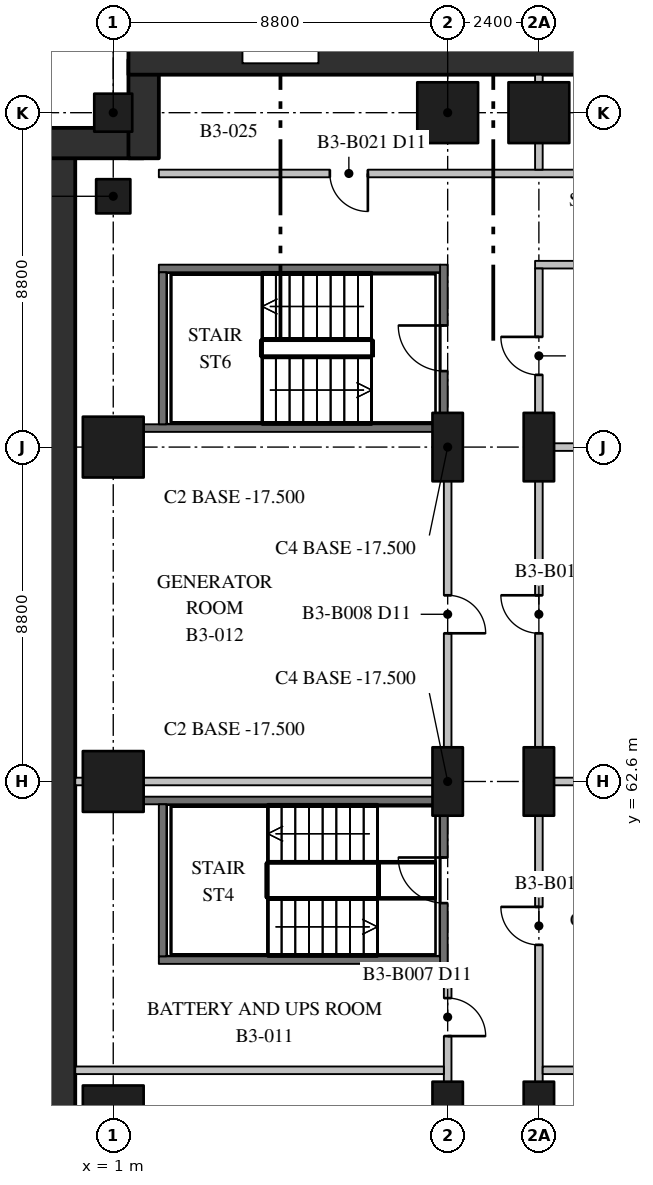
"""IFC4 building model, lengths in metres.
Left out: names, types, materials, properties, quantities, classifications, styles, units other than length and angle.
Written with IfcOpenShell. Run it as: python <this file> out.ifc"""

import sys

from ifc_helpers import new_model, si_unit, direction, frame, frame_2d, origin, origin_2d, place, context, subcontext, project, spatial, rectangle, extrude, element, fill, save


model = new_model("IFC4")
c1 = context("Model", 3, precision=1e-05, world=origin(), true_north=direction((0.0, 1.0)))
c2 = subcontext(c1, "Body", "Model", "MODEL_VIEW")
j1 = project(units=[si_unit("LENGTHUNIT", "METRE"), si_unit("PLANEANGLEUNIT", "RADIAN")], contexts=[c1])
p1 = place(None, origin())
s1 = spatial("IfcSite", under=j1, at=p1, CompositionType="ELEMENT")
p2 = place(p1, origin())
s2 = spatial("IfcBuilding", under=s1, at=p2, CompositionType="ELEMENT")
p3 = place(p2, frame((0.0, 0.0, -17.0)))
s3 = spatial("IfcBuildingStorey", under=s2, at=p3, CompositionType="ELEMENT", Elevation=-17.0)
for number, where, z_axis, x_axis in (
    (1, (1.0, 53.8, -0.5), (0.0, 0.0, 1.0), (1.0, 0.0, 0.0)),
    (2, (1.0, 62.6, -0.5), (0.0, 0.0, 1.0), (1.0, 0.0, 0.0)),
    (3, (1.0, 71.4, -0.5), (0.0, 0.0, 1.0), (1.0, 0.0, 0.0)),
):
    element("IfcColumn", number, at=place(p3, frame(where, z_axis=z_axis, x_axis=x_axis)), inside=s3, PredefinedType="COLUMN", context=c2, shape_type="SweptSolid", body=[
        extrude(rectangle(XDim=1.6, YDim=1.6, at=origin_2d()), origin(), (0.0, 0.0, 1.0), 5.5),
    ])
p4 = place(p3, frame((1.0, 80.2, -0.5), z_axis=(0.0, 0.0, 1.0), x_axis=(1.0, 0.0, 0.0)))
e4 = element("IfcColumn", 4, at=p4, inside=s3, PredefinedType="COLUMN", context=c2, shape_type="SweptSolid", body=[
    extrude(rectangle(XDim=1.0, YDim=1.0, at=origin_2d()), origin(), (0.0, 0.0, 1.0), 5.5),
])
for number, where, z_axis, x_axis in (
    (5, (9.8, 53.8, -0.5), (0.0, 0.0, 1.0), (0.0, 1.0, 0.0)),
    (6, (9.8, 62.6, -0.5), (0.0, 0.0, 1.0), (0.0, 1.0, 0.0)),
    (7, (9.8, 71.4, -0.5), (0.0, 0.0, 1.0), (0.0, 1.0, 0.0)),
):
    element("IfcColumn", number, at=place(p3, frame(where, z_axis=z_axis, x_axis=x_axis)), inside=s3, PredefinedType="COLUMN", context=c2, shape_type="SweptSolid", body=[
        extrude(rectangle(XDim=1.8, YDim=0.8, at=origin_2d()), origin(), (0.0, 0.0, 1.0), 5.5),
    ])
p5 = place(p3, frame((9.8, 80.2, -0.5), z_axis=(0.0, 0.0, 1.0), x_axis=(1.0, 0.0, 0.0)))
e8 = element("IfcColumn", 8, at=p5, inside=s3, PredefinedType="COLUMN", context=c2, shape_type="SweptSolid", body=[
    extrude(rectangle(XDim=1.6, YDim=1.6, at=origin_2d()), origin(), (0.0, 0.0, 1.0), 5.5),
])
for number, where, z_axis, x_axis in (
    (9, (12.2, 53.8, -0.5), (0.0, 0.0, 1.0), (0.0, 1.0, 0.0)),
    (10, (12.2, 62.6, -0.5), (0.0, 0.0, 1.0), (0.0, 1.0, 0.0)),
    (11, (12.2, 71.4, -0.5), (0.0, 0.0, 1.0), (0.0, 1.0, 0.0)),
):
    element("IfcColumn", number, at=place(p3, frame(where, z_axis=z_axis, x_axis=x_axis)), inside=s3, PredefinedType="COLUMN", context=c2, shape_type="SweptSolid", body=[
        extrude(rectangle(XDim=1.8, YDim=0.8, at=origin_2d()), origin(), (0.0, 0.0, 1.0), 5.5),
    ])
p6 = place(p3, frame((12.2, 80.2, -0.5), z_axis=(0.0, 0.0, 1.0), x_axis=(1.0, 0.0, 0.0)))
e12 = element("IfcColumn", 12, at=p6, inside=s3, PredefinedType="COLUMN", context=c2, shape_type="SweptSolid", body=[
    extrude(rectangle(XDim=1.6, YDim=1.6, at=origin_2d()), origin(), (0.0, 0.0, 1.0), 5.5),
])
p7 = place(p3, frame((1.0, 78.0, -0.5), z_axis=(0.0, 0.0, 1.0), x_axis=(1.0, 0.0, 0.0)))
e13 = element("IfcColumn", 13, at=p7, inside=s3, PredefinedType="COLUMN", context=c2, shape_type="SweptSolid", body=[
    extrude(rectangle(XDim=0.9, YDim=0.9, at=origin_2d()), origin(), (0.0, 0.0, 1.0), 5.5),
])
p8 = place(p3, frame((-0.4, 1.4, -0.5), z_axis=(0.0, 0.0, 1.0), x_axis=(0.0, 1.0, 0.0)))
e14 = element("IfcWall", 14, at=p8, inside=s3, PredefinedType="SHEAR", context=c2, shape_type="SweptSolid", body=[
    extrude(rectangle(XDim=78.0, YDim=0.8, at=frame_2d((39.0, 0.0))), origin(), (0.0, 0.0, 1.0), 5.5),
])
for number, where, z_axis, x_axis in (
    (15, (-0.8, 79.4, -0.5), (0.0, 0.0, 1.0), (1.0, 0.0, 0.0)),
    (16, (1.8, 79.0, -0.5), (0.0, 0.0, 1.0), (0.0, 1.0, 0.0)),
):
    element("IfcWall", number, at=place(p3, frame(where, z_axis=z_axis, x_axis=x_axis)), inside=s3, PredefinedType="SHEAR", context=c2, shape_type="SweptSolid", body=[
        extrude(rectangle(XDim=2.6, YDim=0.8, at=frame_2d((1.3, 0.0))), origin(), (0.0, 0.0, 1.0), 5.5),
    ])
p9 = place(p3, frame((1.4, 81.6, -0.5), z_axis=(0.0, 0.0, 1.0), x_axis=(1.0, 0.0, 0.0)))
e17 = element("IfcWall", 17, at=p9, inside=s3, PredefinedType="SHEAR", context=c2, shape_type="SweptSolid", body=[
    extrude(rectangle(XDim=78.0, YDim=0.8, at=frame_2d((39.0, 0.0))), origin(), (0.0, 0.0, 1.0), 5.5),
])
p10 = place(p3, frame((9.7, 57.8, 0.0), z_axis=(0.0, 0.0, 1.0), x_axis=(0.0, 1.0, 0.0)))
e18 = element("IfcWall", 18, at=p10, inside=s3, PredefinedType="SHEAR", context=c2, shape_type="SweptSolid", body=[
    extrude(rectangle(XDim=4.4, YDim=0.2, at=frame_2d((2.2, 0.0))), origin(), (0.0, 0.0, 1.0), 4.6),
])
p11 = place(p10, frame((1.6, 0.0, 0.0)))
e19 = element("IfcOpeningElement", 19, at=p11, cuts=e18, PredefinedType="OPENING", context=c2, shape_type="SweptSolid", body=[
    extrude(rectangle(XDim=1.2, YDim=2.1, at=frame_2d((0.6, 1.05))), frame((0.0, 0.11, 0.0), z_axis=(0.0, -1.0, 0.0), x_axis=(1.0, 0.0, 0.0)), (0.0, 0.0, 1.0), 0.22),
])
p12 = place(p3, frame((1.8, 62.1, 0.0), z_axis=(0.0, 0.0, 1.0), x_axis=(1.0, 0.0, 0.0)))
e20 = element("IfcWall", 20, at=p12, inside=s3, PredefinedType="SHEAR", context=c2, shape_type="SweptSolid", body=[
    extrude(rectangle(XDim=7.8, YDim=0.2, at=frame_2d((3.9, 0.0))), origin(), (0.0, 0.0, 1.0), 4.6),
])
p13 = place(p3, frame((2.2, 57.9, 0.0), z_axis=(0.0, 0.0, 1.0), x_axis=(1.0, 0.0, 0.0)))
e21 = element("IfcWall", 21, at=p13, inside=s3, PredefinedType="SHEAR", context=c2, shape_type="SweptSolid", body=[
    extrude(rectangle(XDim=7.4, YDim=0.2, at=frame_2d((3.7, 0.0))), origin(), (0.0, 0.0, 1.0), 4.6),
])
p14 = place(p3, frame((2.3, 58.0, 0.0), z_axis=(0.0, 0.0, 1.0), x_axis=(0.0, 1.0, 0.0)))
e22 = element("IfcWall", 22, at=p14, inside=s3, PredefinedType="SHEAR", context=c2, shape_type="SweptSolid", body=[
    extrude(rectangle(XDim=4.0, YDim=0.2, at=frame_2d((2.0, 0.0))), origin(), (0.0, 0.0, 1.0), 4.6),
])
p15 = place(p3, frame((9.7, 71.8, 0.0), z_axis=(0.0, 0.0, 1.0), x_axis=(0.0, 1.0, 0.0)))
e23 = element("IfcWall", 23, at=p15, inside=s3, PredefinedType="SHEAR", context=c2, shape_type="SweptSolid", body=[
    extrude(rectangle(XDim=4.4, YDim=0.2, at=frame_2d((2.2, 0.0))), origin(), (0.0, 0.0, 1.0), 4.6),
])
p16 = place(p15, frame((1.6, 0.0, 0.0)))
e24 = element("IfcOpeningElement", 24, at=p16, cuts=e23, PredefinedType="OPENING", context=c2, shape_type="SweptSolid", body=[
    extrude(rectangle(XDim=1.2, YDim=2.1, at=frame_2d((0.6, 1.05))), frame((0.0, 0.11, 0.0), z_axis=(0.0, -1.0, 0.0), x_axis=(1.0, 0.0, 0.0)), (0.0, 0.0, 1.0), 0.22),
])
p17 = place(p3, frame((2.2, 76.1, 0.0), z_axis=(0.0, 0.0, 1.0), x_axis=(1.0, 0.0, 0.0)))
e25 = element("IfcWall", 25, at=p17, inside=s3, PredefinedType="SHEAR", context=c2, shape_type="SweptSolid", body=[
    extrude(rectangle(XDim=7.4, YDim=0.2, at=frame_2d((3.7, 0.0))), origin(), (0.0, 0.0, 1.0), 4.6),
])
p18 = place(p3, frame((1.8, 71.9, 0.0), z_axis=(0.0, 0.0, 1.0), x_axis=(1.0, 0.0, 0.0)))
e26 = element("IfcWall", 26, at=p18, inside=s3, PredefinedType="SHEAR", context=c2, shape_type="SweptSolid", body=[
    extrude(rectangle(XDim=7.8, YDim=0.2, at=frame_2d((3.9, 0.0))), origin(), (0.0, 0.0, 1.0), 4.6),
])
p19 = place(p3, frame((2.3, 72.0, 0.0), z_axis=(0.0, 0.0, 1.0), x_axis=(0.0, 1.0, 0.0)))
e27 = element("IfcWall", 27, at=p19, inside=s3, PredefinedType="SHEAR", context=c2, shape_type="SweptSolid", body=[
    extrude(rectangle(XDim=4.0, YDim=0.2, at=frame_2d((2.0, 0.0))), origin(), (0.0, 0.0, 1.0), 4.6),
])
p20 = place(p3, frame((12.1, 76.2, 0.0), z_axis=(0.0, 0.0, 1.0), x_axis=(1.0, 0.0, 0.0)))
e28 = element("IfcWall", 28, at=p20, inside=s3, PredefinedType="PARTITIONING", context=c2, shape_type="SweptSolid", body=[
    extrude(rectangle(XDim=9.0, YDim=0.2, at=frame_2d((4.5, 0.0))), origin(), (0.0, 0.0, 1.0), 4.6),
])
p21 = place(p3, frame((2.2, 78.6, 0.0), z_axis=(0.0, 0.0, 1.0), x_axis=(1.0, 0.0, 0.0)))
e29 = element("IfcWall", 29, at=p21, inside=s3, PredefinedType="PARTITIONING", context=c2, shape_type="SweptSolid", body=[
    extrude(rectangle(XDim=23.7, YDim=0.2, at=frame_2d((11.85, 0.0))), origin(), (0.0, 0.0, 1.0), 4.6),
])
p22 = place(p21, frame((4.5, 0.0, 0.0)))
e30 = element("IfcOpeningElement", 30, at=p22, cuts=e29, PredefinedType="OPENING", context=c2, shape_type="SweptSolid", body=[
    extrude(rectangle(XDim=1.0, YDim=2.1, at=frame_2d((0.5, 1.05))), frame((0.0, 0.11, 0.0), z_axis=(0.0, -1.0, 0.0), x_axis=(1.0, 0.0, 0.0)), (0.0, 0.0, 1.0), 0.22),
])
p23 = place(p21, frame((16.3, 0.0, 0.0)))
e31 = element("IfcOpeningElement", 31, at=p23, cuts=e29, PredefinedType="OPENING", context=c2, shape_type="SweptSolid", body=[
    extrude(rectangle(XDim=1.0, YDim=2.1, at=frame_2d((0.5, 1.05))), frame((0.0, 0.11, 0.0), z_axis=(0.0, -1.0, 0.0), x_axis=(1.0, 0.0, 0.0)), (0.0, 0.0, 1.0), 0.22),
])
p24 = place(p3, frame((0.0, 55.0, 0.0), z_axis=(0.0, 0.0, 1.0), x_axis=(1.0, 0.0, 0.0)))
e32 = element("IfcWall", 32, at=p24, inside=s3, PredefinedType="PARTITIONING", context=c2, shape_type="SweptSolid", body=[
    extrude(rectangle(XDim=9.7, YDim=0.2, at=frame_2d((4.85, 0.0))), origin(), (0.0, 0.0, 1.0), 4.6),
])
p25 = place(p3, frame((12.3, 55.0, 0.0), z_axis=(0.0, 0.0, 1.0), x_axis=(1.0, 0.0, 0.0)))
e33 = element("IfcWall", 33, at=p25, inside=s3, PredefinedType="PARTITIONING", context=c2, shape_type="SweptSolid", body=[
    extrude(rectangle(XDim=8.6, YDim=0.2, at=frame_2d((4.3, 0.0))), origin(), (0.0, 0.0, 1.0), 4.6),
])
p26 = place(p3, frame((0.0, 62.6, 0.0), z_axis=(0.0, 0.0, 1.0), x_axis=(1.0, 0.0, 0.0)))
e34 = element("IfcWall", 34, at=p26, inside=s3, PredefinedType="PARTITIONING", context=c2, shape_type="SweptSolid", body=[
    extrude(rectangle(XDim=9.7, YDim=0.2, at=frame_2d((4.85, 0.0))), origin(), (0.0, 0.0, 1.0), 4.6),
])
for number, where, z_axis, x_axis in (
    (35, (12.3, 62.6, 0.0), (0.0, 0.0, 1.0), (1.0, 0.0, 0.0)),
    (36, (12.3, 71.4, 0.0), (0.0, 0.0, 1.0), (1.0, 0.0, 0.0)),
):
    element("IfcWall", number, at=place(p3, frame(where, z_axis=z_axis, x_axis=x_axis)), inside=s3, PredefinedType="PARTITIONING", context=c2, shape_type="SweptSolid", body=[
        extrude(rectangle(XDim=8.6, YDim=0.2, at=frame_2d((4.3, 0.0))), origin(), (0.0, 0.0, 1.0), 4.6),
    ])
p27 = place(p3, frame((9.8, 9.8, 0.0), z_axis=(0.0, 0.0, 1.0), x_axis=(0.0, 1.0, 0.0)))
e37 = element("IfcWall", 37, at=p27, inside=s3, PredefinedType="PARTITIONING", context=c2, shape_type="SweptSolid", body=[
    extrude(rectangle(XDim=48.0, YDim=0.2, at=frame_2d((24.0, 0.0))), origin(), (0.0, 0.0, 1.0), 4.6),
])
p28 = place(p27, frame((0.4, 0.0, 0.0)))
e38 = element("IfcOpeningElement", 38, at=p28, cuts=e37, PredefinedType="OPENING", context=c2, shape_type="SweptSolid", body=[
    extrude(rectangle(XDim=1.0, YDim=2.1, at=frame_2d((0.5, 1.05))), frame((0.0, 0.11, 0.0), z_axis=(0.0, -1.0, 0.0), x_axis=(1.0, 0.0, 0.0)), (0.0, 0.0, 1.0), 0.22),
])
p29 = place(p27, frame((6.7, 0.0, 0.0)))
e39 = element("IfcOpeningElement", 39, at=p29, cuts=e37, PredefinedType="OPENING", context=c2, shape_type="SweptSolid", body=[
    extrude(rectangle(XDim=1.0, YDim=2.1, at=frame_2d((0.5, 1.05))), frame((0.0, 0.11, 0.0), z_axis=(0.0, -1.0, 0.0), x_axis=(1.0, 0.0, 0.0)), (0.0, 0.0, 1.0), 0.22),
])
p30 = place(p27, frame((14.1, 0.0, 0.0)))
e40 = element("IfcOpeningElement", 40, at=p30, cuts=e37, PredefinedType="OPENING", context=c2, shape_type="SweptSolid", body=[
    extrude(rectangle(XDim=1.0, YDim=2.1, at=frame_2d((0.5, 1.05))), frame((0.0, 0.11, 0.0), z_axis=(0.0, -1.0, 0.0), x_axis=(1.0, 0.0, 0.0)), (0.0, 0.0, 1.0), 0.22),
])
p31 = place(p27, frame((21.8, 0.0, 0.0)))
e41 = element("IfcOpeningElement", 41, at=p31, cuts=e37, PredefinedType="OPENING", context=c2, shape_type="SweptSolid", body=[
    extrude(rectangle(XDim=1.0, YDim=2.1, at=frame_2d((0.5, 1.05))), frame((0.0, 0.11, 0.0), z_axis=(0.0, -1.0, 0.0), x_axis=(1.0, 0.0, 0.0)), (0.0, 0.0, 1.0), 0.22),
])
p32 = place(p27, frame((30.5, 0.0, 0.0)))
e42 = element("IfcOpeningElement", 42, at=p32, cuts=e37, PredefinedType="OPENING", context=c2, shape_type="SweptSolid", body=[
    extrude(rectangle(XDim=1.0, YDim=2.1, at=frame_2d((0.5, 1.05))), frame((0.0, 0.11, 0.0), z_axis=(0.0, -1.0, 0.0), x_axis=(1.0, 0.0, 0.0)), (0.0, 0.0, 1.0), 0.22),
])
p33 = place(p27, frame((39.4, 0.0, 0.0)))
e43 = element("IfcOpeningElement", 43, at=p33, cuts=e37, PredefinedType="OPENING", context=c2, shape_type="SweptSolid", body=[
    extrude(rectangle(XDim=1.0, YDim=2.1, at=frame_2d((0.5, 1.05))), frame((0.0, 0.11, 0.0), z_axis=(0.0, -1.0, 0.0), x_axis=(1.0, 0.0, 0.0)), (0.0, 0.0, 1.0), 0.22),
])
p34 = place(p27, frame((46.1, 0.0, 0.0)))
e44 = element("IfcOpeningElement", 44, at=p34, cuts=e37, PredefinedType="OPENING", context=c2, shape_type="SweptSolid", body=[
    extrude(rectangle(XDim=1.0, YDim=2.1, at=frame_2d((0.5, 1.05))), frame((0.0, 0.11, 0.0), z_axis=(0.0, -1.0, 0.0), x_axis=(1.0, 0.0, 0.0)), (0.0, 0.0, 1.0), 0.22),
])
p35 = place(p3, frame((9.8, 62.2, 0.0), z_axis=(0.0, 0.0, 1.0), x_axis=(0.0, 1.0, 0.0)))
e45 = element("IfcWall", 45, at=p35, inside=s3, PredefinedType="PARTITIONING", context=c2, shape_type="SweptSolid", body=[
    extrude(rectangle(XDim=9.2, YDim=0.2, at=frame_2d((4.6, 0.0))), origin(), (0.0, 0.0, 1.0), 4.6),
])
p36 = place(p35, frame((4.3, 0.0, 0.0)))
e46 = element("IfcOpeningElement", 46, at=p36, cuts=e45, PredefinedType="OPENING", context=c2, shape_type="SweptSolid", body=[
    extrude(rectangle(XDim=1.0, YDim=2.1, at=frame_2d((0.5, 1.05))), frame((0.0, 0.11, 0.0), z_axis=(0.0, -1.0, 0.0), x_axis=(1.0, 0.0, 0.0)), (0.0, 0.0, 1.0), 0.22),
])
p37 = place(p3, frame((12.2, 12.3, 0.0), z_axis=(0.0, 0.0, 1.0), x_axis=(0.0, 1.0, 0.0)))
e47 = element("IfcWall", 47, at=p37, inside=s3, PredefinedType="PARTITIONING", context=c2, shape_type="SweptSolid", body=[
    extrude(rectangle(XDim=63.8, YDim=0.2, at=frame_2d((31.9, 0.0))), origin(), (0.0, 0.0, 1.0), 4.6),
])
p38 = place(p37, frame((4.2, 0.0, 0.0)))
e48 = element("IfcOpeningElement", 48, at=p38, cuts=e47, PredefinedType="OPENING", context=c2, shape_type="SweptSolid", body=[
    extrude(rectangle(XDim=1.0, YDim=2.1, at=frame_2d((0.5, 1.05))), frame((0.0, 0.11, 0.0), z_axis=(0.0, -1.0, 0.0), x_axis=(1.0, 0.0, 0.0)), (0.0, 0.0, 1.0), 0.22),
])
p39 = place(p37, frame((11.6, 0.0, 0.0)))
e49 = element("IfcOpeningElement", 49, at=p39, cuts=e47, PredefinedType="OPENING", context=c2, shape_type="SweptSolid", body=[
    extrude(rectangle(XDim=1.0, YDim=2.1, at=frame_2d((0.5, 1.05))), frame((0.0, 0.11, 0.0), z_axis=(0.0, -1.0, 0.0), x_axis=(1.0, 0.0, 0.0)), (0.0, 0.0, 1.0), 0.22),
])
p40 = place(p37, frame((19.3, 0.0, 0.0)))
e50 = element("IfcOpeningElement", 50, at=p40, cuts=e47, PredefinedType="OPENING", context=c2, shape_type="SweptSolid", body=[
    extrude(rectangle(XDim=1.0, YDim=2.1, at=frame_2d((0.5, 1.05))), frame((0.0, 0.11, 0.0), z_axis=(0.0, -1.0, 0.0), x_axis=(1.0, 0.0, 0.0)), (0.0, 0.0, 1.0), 0.22),
])
p41 = place(p37, frame((28.0, 0.0, 0.0)))
e51 = element("IfcOpeningElement", 51, at=p41, cuts=e47, PredefinedType="OPENING", context=c2, shape_type="SweptSolid", body=[
    extrude(rectangle(XDim=1.0, YDim=2.1, at=frame_2d((0.5, 1.05))), frame((0.0, 0.11, 0.0), z_axis=(0.0, -1.0, 0.0), x_axis=(1.0, 0.0, 0.0)), (0.0, 0.0, 1.0), 0.22),
])
p42 = place(p37, frame((36.9, 0.0, 0.0)))
e52 = element("IfcOpeningElement", 52, at=p42, cuts=e47, PredefinedType="OPENING", context=c2, shape_type="SweptSolid", body=[
    extrude(rectangle(XDim=1.0, YDim=2.1, at=frame_2d((0.5, 1.05))), frame((0.0, 0.11, 0.0), z_axis=(0.0, -1.0, 0.0), x_axis=(1.0, 0.0, 0.0)), (0.0, 0.0, 1.0), 0.22),
])
p43 = place(p37, frame((46.0, 0.0, 0.0)))
e53 = element("IfcOpeningElement", 53, at=p43, cuts=e47, PredefinedType="OPENING", context=c2, shape_type="SweptSolid", body=[
    extrude(rectangle(XDim=1.0, YDim=2.1, at=frame_2d((0.5, 1.05))), frame((0.0, 0.11, 0.0), z_axis=(0.0, -1.0, 0.0), x_axis=(1.0, 0.0, 0.0)), (0.0, 0.0, 1.0), 0.22),
])
p44 = place(p37, frame((54.2, 0.0, 0.0)))
e54 = element("IfcOpeningElement", 54, at=p44, cuts=e47, PredefinedType="OPENING", context=c2, shape_type="SweptSolid", body=[
    extrude(rectangle(XDim=1.0, YDim=2.1, at=frame_2d((0.5, 1.05))), frame((0.0, 0.11, 0.0), z_axis=(0.0, -1.0, 0.0), x_axis=(1.0, 0.0, 0.0)), (0.0, 0.0, 1.0), 0.22),
])
p45 = place(p37, frame((61.0, 0.0, 0.0)))
e55 = element("IfcOpeningElement", 55, at=p45, cuts=e47, PredefinedType="OPENING", context=c2, shape_type="SweptSolid", body=[
    extrude(rectangle(XDim=1.0, YDim=2.1, at=frame_2d((0.5, 1.05))), frame((0.0, 0.11, 0.0), z_axis=(0.0, -1.0, 0.0), x_axis=(1.0, 0.0, 0.0)), (0.0, 0.0, 1.0), 0.22),
])
p46 = place(p3, frame((12.2, 78.7, 0.0), z_axis=(0.0, 0.0, 1.0), x_axis=(0.0, 1.0, 0.0)))
e56 = element("IfcWall", 56, at=p46, inside=s3, PredefinedType="PARTITIONING", context=c2, shape_type="SweptSolid", body=[
    extrude(rectangle(XDim=2.5, YDim=0.2, at=frame_2d((1.25, 0.0))), origin(), (0.0, 0.0, 1.0), 4.6),
])
p47 = place(p11, origin())
e57 = element("IfcDoor", 57, at=p47, inside=s3, OperationType="SINGLE_SWING_RIGHT", PredefinedType="DOOR", context=c2, shape_type="SweptSolid", body=[
    extrude(rectangle(XDim=1.2, YDim=2.1, at=frame_2d((0.6, 1.05))), frame((0.0, 0.025, 0.0), z_axis=(0.0, -1.0, 0.0), x_axis=(1.0, 0.0, 0.0)), (0.0, 0.0, 1.0), 0.05),
])
fill(e19, e57)
p48 = place(p16, origin())
e58 = element("IfcDoor", 58, at=p48, inside=s3, OperationType="SINGLE_SWING_RIGHT", PredefinedType="DOOR", context=c2, shape_type="SweptSolid", body=[
    extrude(rectangle(XDim=1.2, YDim=2.1, at=frame_2d((0.6, 1.05))), frame((0.0, 0.025, 0.0), z_axis=(0.0, -1.0, 0.0), x_axis=(1.0, 0.0, 0.0)), (0.0, 0.0, 1.0), 0.05),
])
fill(e24, e58)
p49 = place(p34, frame((1.0, 0.0, 0.0), z_axis=(0.0, 0.0, 1.0), x_axis=(-1.0, 0.0, 0.0)))
e59 = element("IfcDoor", 59, at=p49, inside=s3, OperationType="SINGLE_SWING_LEFT", PredefinedType="DOOR", context=c2, shape_type="SweptSolid", body=[
    extrude(rectangle(XDim=1.0, YDim=2.1, at=frame_2d((0.5, 1.05))), frame((0.0, 0.025, 0.0), z_axis=(0.0, -1.0, 0.0), x_axis=(1.0, 0.0, 0.0)), (0.0, 0.0, 1.0), 0.05),
])
fill(e44, e59)
p50 = place(p36, frame((1.0, 0.0, 0.0), z_axis=(0.0, 0.0, 1.0), x_axis=(-1.0, 0.0, 0.0)))
e60 = element("IfcDoor", 60, at=p50, inside=s3, OperationType="SINGLE_SWING_LEFT", PredefinedType="DOOR", context=c2, shape_type="SweptSolid", body=[
    extrude(rectangle(XDim=1.0, YDim=2.1, at=frame_2d((0.5, 1.05))), frame((0.0, 0.025, 0.0), z_axis=(0.0, -1.0, 0.0), x_axis=(1.0, 0.0, 0.0)), (0.0, 0.0, 1.0), 0.05),
])
fill(e46, e60)
p51 = place(p43, origin())
e61 = element("IfcDoor", 61, at=p51, inside=s3, OperationType="SINGLE_SWING_RIGHT", PredefinedType="DOOR", context=c2, shape_type="SweptSolid", body=[
    extrude(rectangle(XDim=1.0, YDim=2.1, at=frame_2d((0.5, 1.05))), frame((0.0, 0.025, 0.0), z_axis=(0.0, -1.0, 0.0), x_axis=(1.0, 0.0, 0.0)), (0.0, 0.0, 1.0), 0.05),
])
fill(e53, e61)
p52 = place(p44, origin())
e62 = element("IfcDoor", 62, at=p52, inside=s3, OperationType="SINGLE_SWING_RIGHT", PredefinedType="DOOR", context=c2, shape_type="SweptSolid", body=[
    extrude(rectangle(XDim=1.0, YDim=2.1, at=frame_2d((0.5, 1.05))), frame((0.0, 0.025, 0.0), z_axis=(0.0, -1.0, 0.0), x_axis=(1.0, 0.0, 0.0)), (0.0, 0.0, 1.0), 0.05),
])
fill(e54, e62)
p53 = place(p45, origin())
e63 = element("IfcDoor", 63, at=p53, inside=s3, OperationType="SINGLE_SWING_RIGHT", PredefinedType="DOOR", context=c2, shape_type="SweptSolid", body=[
    extrude(rectangle(XDim=1.0, YDim=2.1, at=frame_2d((0.5, 1.05))), frame((0.0, 0.025, 0.0), z_axis=(0.0, -1.0, 0.0), x_axis=(1.0, 0.0, 0.0)), (0.0, 0.0, 1.0), 0.05),
])
fill(e55, e63)
p54 = place(p22, frame((1.0, 0.0, 0.0), z_axis=(0.0, 0.0, 1.0), x_axis=(-1.0, 0.0, 0.0)))
e64 = element("IfcDoor", 64, at=p54, inside=s3, OperationType="SINGLE_SWING_RIGHT", PredefinedType="DOOR", context=c2, shape_type="SweptSolid", body=[
    extrude(rectangle(XDim=1.0, YDim=2.1, at=frame_2d((0.5, 1.05))), frame((0.0, 0.025, 0.0), z_axis=(0.0, -1.0, 0.0), x_axis=(1.0, 0.0, 0.0)), (0.0, 0.0, 1.0), 0.05),
])
fill(e30, e64)
save(model, sys.argv[1])
